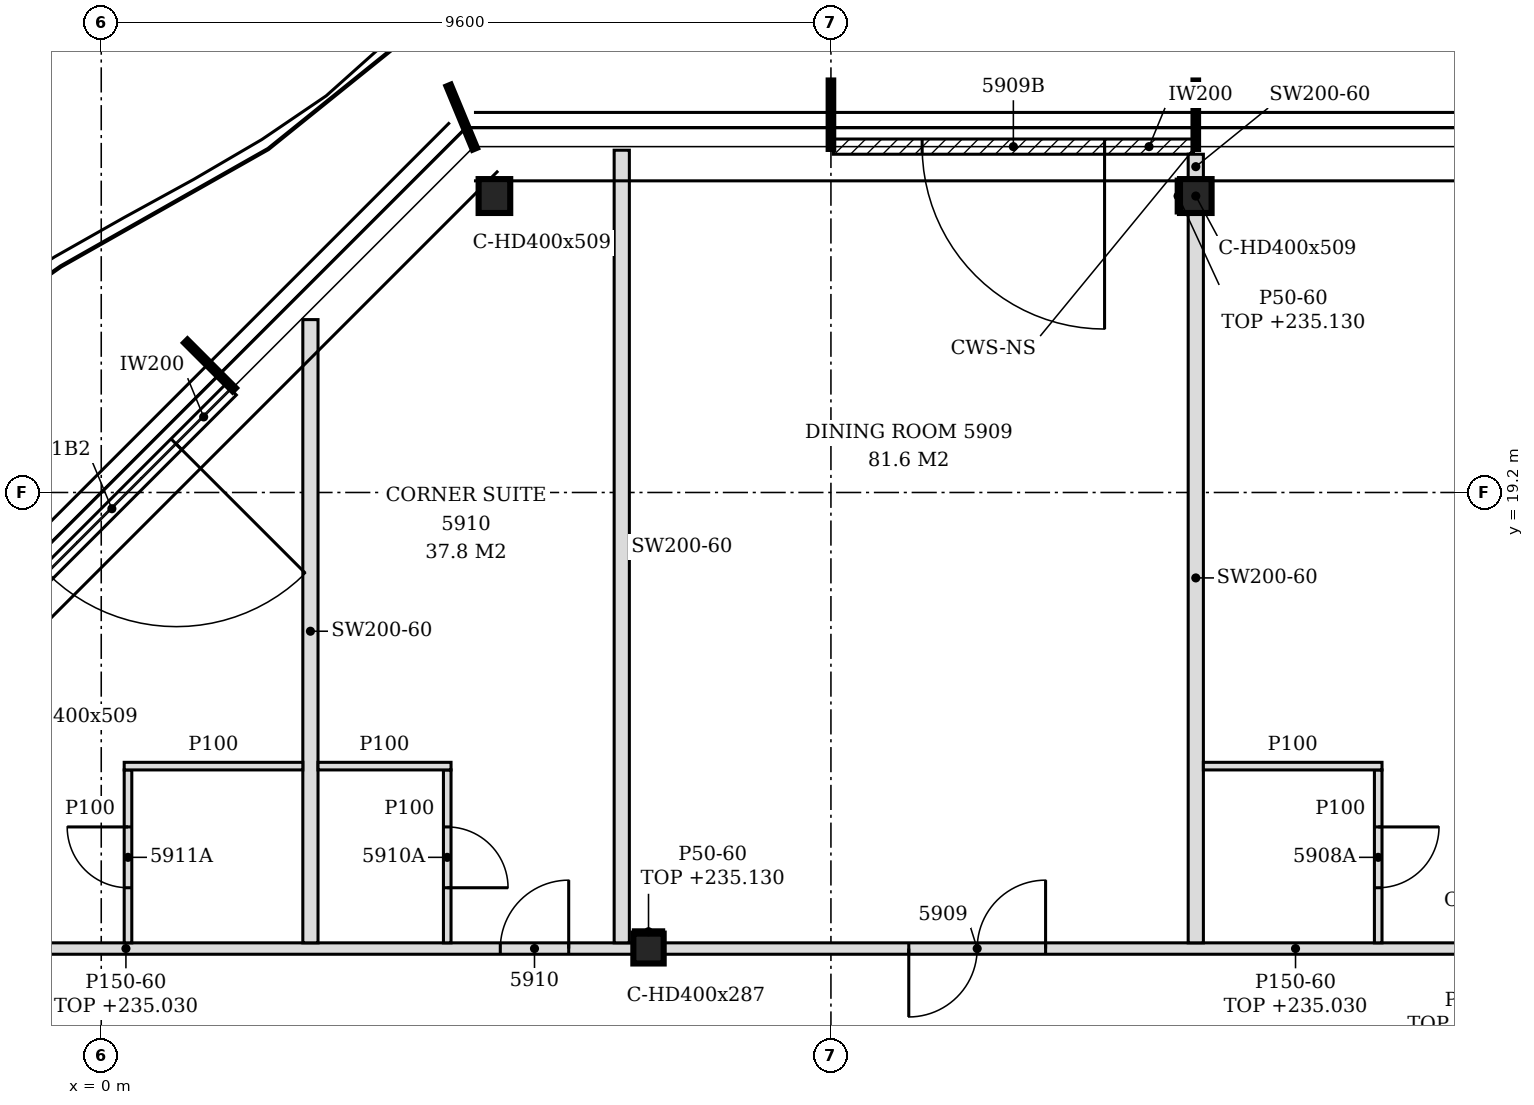
"""IFC4 building model, lengths in metres.
Left out: names, types, materials, properties, quantities, classifications, styles, units other than length and angle.
Written with IfcOpenShell. Run it as: python <this file> out.ifc"""

import sys

from ifc_helpers import new_model, si_unit, direction, frame, frame_2d, origin, origin_2d, place, context, subcontext, project, spatial, polyline, rectangle, i_section, outline, extrude, element, fill, save


model = new_model("IFC4")
c1 = context("Model", 3, precision=1e-05, world=origin(), true_north=direction((0.0, 1.0)))
c2 = subcontext(c1, "Body", "Model", "MODEL_VIEW")
j1 = project(units=[si_unit("LENGTHUNIT", "METRE"), si_unit("PLANEANGLEUNIT", "RADIAN")], contexts=[c1])
p1 = place(None, origin())
s1 = spatial("IfcSite", under=j1, at=p1, CompositionType="ELEMENT")
p2 = place(p1, origin())
s2 = spatial("IfcBuilding", under=s1, at=p2, CompositionType="ELEMENT")
p3 = place(p2, frame((0.0, 0.0, 232.2)))
s3 = spatial("IfcBuildingStorey", under=s2, at=p3, CompositionType="ELEMENT", Elevation=232.2)
for number, where, z_axis, x_axis in (
    (1, (14.4, 23.1, -0.15), (0.0, 0.0, 1.0), (1.0, 0.0, 0.0)),
    (2, (5.173, 23.1, -0.15), (0.0, 0.0, 1.0), (1.0, 0.0, 0.0)),
):
    element("IfcColumn", number, at=place(p3, frame(where, z_axis=z_axis, x_axis=x_axis)), inside=s3, PredefinedType="COLUMN", context=c2, shape_type="SweptSolid", body=[
        extrude(i_section(OverallWidth=0.416, OverallDepth=0.446, WebThickness=0.039, FlangeThickness=0.063, FilletRadius=0.015, at=origin_2d()), origin(), (0.0, 0.0, 1.0), 3.6),
    ])
p4 = place(p3, frame((7.2, 13.2, -0.15), z_axis=(0.0, 0.0, 1.0), x_axis=(1.0, 0.0, 0.0)))
e3 = element("IfcColumn", 3, at=p4, inside=s3, PredefinedType="COLUMN", context=c2, shape_type="SweptSolid", body=[
    extrude(i_section(OverallWidth=0.399, OverallDepth=0.393, WebThickness=0.023, FlangeThickness=0.037, FilletRadius=0.015, at=origin_2d()), origin(), (0.0, 0.0, 1.0), 3.6),
])
p5 = place(p3, frame((14.37, 23.75, 0.0), z_axis=(0.0, 0.0, 1.0), x_axis=(-1.0, 0.0, 0.0)))
e4 = element("IfcWall", 4, at=p5, inside=s3, PredefinedType="NOTDEFINED", context=c2, shape_type="SweptSolid", body=[
    extrude(rectangle(XDim=4.74, YDim=0.2, at=frame_2d((2.37, 0.0))), origin(), (0.0, 0.0, 1.0), 3.45),
])
p6 = place(p5, frame((1.17, 0.0, 0.0)))
e5 = element("IfcOpeningElement", 5, at=p6, cuts=e4, PredefinedType="OPENING", context=c2, shape_type="SweptSolid", body=[
    extrude(rectangle(XDim=2.4, YDim=2.4, at=frame_2d((1.2, 1.2))), frame((0.0, 0.11, 0.0), z_axis=(0.0, -1.0, 0.0), x_axis=(1.0, 0.0, 0.0)), (0.0, 0.0, 1.0), 0.22),
])
p7 = place(p3, frame((1.707, 20.553, 0.0), z_axis=(0.0, 0.0, 1.0), x_axis=(-0.707106781187, -0.707106781187, 0.0)))
e6 = element("IfcWall", 6, at=p7, inside=s3, PredefinedType="NOTDEFINED", context=c2, shape_type="SweptSolid", body=[
    extrude(rectangle(XDim=4.431, YDim=0.2, at=frame_2d((2.216, 0.0))), origin(), (0.0, 0.0, 1.0), 3.45),
])
p8 = place(p7, frame((1.016, 0.0, 0.0)))
e7 = element("IfcOpeningElement", 7, at=p8, cuts=e6, PredefinedType="OPENING", context=c2, shape_type="SweptSolid", body=[
    extrude(rectangle(XDim=2.4, YDim=2.4, at=frame_2d((1.2, 1.2))), frame((0.0, 0.11, 0.0), z_axis=(0.0, -1.0, 0.0), x_axis=(1.0, 0.0, 0.0)), (0.0, 0.0, 1.0), 0.22),
])
p9 = place(p3, frame((-4.601, 13.2, 0.0), z_axis=(0.0, 0.0, 1.0), x_axis=(1.0, 0.0, 0.0)))
e8 = element("IfcWall", 8, at=p9, inside=s3, PredefinedType="PARTITIONING", context=c2, shape_type="SweptSolid", body=[
    extrude(outline(polyline([(0.0, 0.0), (11.601, 0.0), (11.601, 2.83), (0.443, 2.83), (0.441, 2.63), (0.0, 2.63), (0.0, 0.0)])), frame((0.0, 0.075, 0.0), z_axis=(0.0, -1.0, 0.0), x_axis=(1.0, 0.0, 0.0)), (0.0, 0.0, 1.0), 0.15),
])
p10 = place(p9, frame((9.851, 0.0, 0.0)))
e9 = element("IfcOpeningElement", 9, at=p10, cuts=e8, PredefinedType="OPENING", context=c2, shape_type="SweptSolid", body=[
    extrude(rectangle(XDim=0.9, YDim=2.1, at=frame_2d((0.45, 1.05))), frame((0.0, 0.085, 0.0), z_axis=(0.0, -1.0, 0.0), x_axis=(1.0, 0.0, 0.0)), (0.0, 0.0, 1.0), 0.17),
])
p11 = place(p3, frame((7.399, 13.2, 0.0), z_axis=(0.0, 0.0, 1.0), x_axis=(1.0, 0.0, 0.0)))
e10 = element("IfcWall", 10, at=p11, inside=s3, PredefinedType="PARTITIONING", context=c2, shape_type="SweptSolid", body=[
    extrude(rectangle(XDim=11.601, YDim=0.15, at=frame_2d((5.801, 0.0))), origin(), (0.0, 0.0, 1.0), 2.83),
])
p12 = place(p11, frame((3.225, 0.0, 0.0)))
e11 = element("IfcOpeningElement", 11, at=p12, cuts=e10, PredefinedType="OPENING", context=c2, shape_type="SweptSolid", body=[
    extrude(rectangle(XDim=1.8, YDim=2.1, at=frame_2d((0.9, 1.05))), frame((0.0, 0.085, 0.0), z_axis=(0.0, -1.0, 0.0), x_axis=(1.0, 0.0, 0.0)), (0.0, 0.0, 1.0), 0.17),
])
p13 = place(p3, frame((0.352, 13.275, 0.0), z_axis=(0.0, 0.0, 1.0), x_axis=(0.0, 1.0, 0.0)))
e12 = element("IfcWall", 12, at=p13, inside=s3, PredefinedType="PARTITIONING", context=c2, shape_type="SweptSolid", body=[
    extrude(outline(polyline([(0.0, 0.0), (2.275, 0.0), (2.275, 3.45), (0.075, 3.45), (0.073, 2.83), (0.0, 2.83), (0.0, 0.0)])), frame((0.0, 0.05, 0.0), z_axis=(0.0, -1.0, 0.0), x_axis=(1.0, 0.0, 0.0)), (0.0, 0.0, 1.0), 0.1),
])
p14 = place(p13, frame((0.725, 0.0, 0.0)))
e13 = element("IfcOpeningElement", 13, at=p14, cuts=e12, PredefinedType="OPENING", context=c2, shape_type="SweptSolid", body=[
    extrude(rectangle(XDim=0.8, YDim=2.1, at=frame_2d((0.4, 1.05))), frame((0.0, 0.06, 0.0), z_axis=(0.0, -1.0, 0.0), x_axis=(1.0, 0.0, 0.0)), (0.0, 0.0, 1.0), 0.12),
])
p15 = place(p3, frame((2.752, 13.275, 0.0), z_axis=(0.0, 0.0, 1.0), x_axis=(0.0, 1.0, 0.0)))
e14 = element("IfcWall", 14, at=p15, inside=s3, PredefinedType="PARTITIONING", context=c2, shape_type="SweptSolid", body=[
    extrude(outline(polyline([(0.0, 0.0), (8.199, 0.0), (8.199, 3.45), (7.716, 3.45), (7.714, 2.93), (7.092, 2.93), (7.09, 3.45), (6.01, 3.45), (6.008, 3.07), (5.84, 3.07), (5.838, 3.45), (0.075, 3.45), (0.073, 2.83), (0.0, 2.83), (0.0, 0.0)])), frame((0.0, 0.1, 0.0), z_axis=(0.0, -1.0, 0.0), x_axis=(1.0, 0.0, 0.0)), (0.0, 0.0, 1.0), 0.2),
])
p16 = place(p3, frame((4.552, 13.275, 0.0), z_axis=(0.0, 0.0, 1.0), x_axis=(0.0, 1.0, 0.0)))
e15 = element("IfcWall", 15, at=p16, inside=s3, PredefinedType="PARTITIONING", context=c2, shape_type="SweptSolid", body=[
    extrude(outline(polyline([(0.0, 0.0), (2.275, 0.0), (2.275, 3.45), (0.075, 3.45), (0.073, 2.83), (0.0, 2.83), (0.0, 0.0)])), frame((0.0, 0.05, 0.0), z_axis=(0.0, -1.0, 0.0), x_axis=(1.0, 0.0, 0.0)), (0.0, 0.0, 1.0), 0.1),
])
p17 = place(p16, frame((0.725, 0.0, 0.0)))
e16 = element("IfcOpeningElement", 16, at=p17, cuts=e15, PredefinedType="OPENING", context=c2, shape_type="SweptSolid", body=[
    extrude(rectangle(XDim=0.8, YDim=2.1, at=frame_2d((0.4, 1.05))), frame((0.0, 0.06, 0.0), z_axis=(0.0, -1.0, 0.0), x_axis=(1.0, 0.0, 0.0)), (0.0, 0.0, 1.0), 0.12),
])
p18 = place(p3, frame((6.848, 13.275, 0.0), z_axis=(0.0, 0.0, 1.0), x_axis=(0.0, 1.0, 0.0)))
e17 = element("IfcWall", 17, at=p18, inside=s3, PredefinedType="PARTITIONING", context=c2, shape_type="SweptSolid", body=[
    extrude(outline(polyline([(0.0, 0.0), (10.428, 0.0), (10.428, 3.45), (9.975, 3.45), (9.973, 2.93), (9.675, 2.93), (9.673, 3.45), (6.01, 3.45), (6.008, 3.07), (5.84, 3.07), (5.838, 3.45), (0.075, 3.45), (0.073, 2.83), (0.0, 2.83), (0.0, 0.0)])), frame((0.0, 0.1, 0.0), z_axis=(0.0, -1.0, 0.0), x_axis=(1.0, 0.0, 0.0)), (0.0, 0.0, 1.0), 0.2),
])
p19 = place(p3, frame((14.4, 13.275, 0.0), z_axis=(0.0, 0.0, 1.0), x_axis=(0.0, 1.0, 0.0)))
e18 = element("IfcWall", 18, at=p19, inside=s3, PredefinedType="PARTITIONING", context=c2, shape_type="SweptSolid", body=[
    extrude(outline(polyline([(0.0, 0.0), (9.602, 0.0), (9.602, 3.45), (6.03, 3.45), (6.028, 2.88), (5.82, 2.88), (5.818, 3.45), (0.075, 3.45), (0.073, 2.83), (0.0, 2.83), (0.0, 0.0)])), frame((0.0, 0.1, 0.0), z_axis=(0.0, -1.0, 0.0), x_axis=(1.0, 0.0, 0.0)), (0.0, 0.0, 1.0), 0.2),
])
p20 = place(p3, frame((16.8, 13.275, 0.0), z_axis=(0.0, 0.0, 1.0), x_axis=(0.0, 1.0, 0.0)))
e19 = element("IfcWall", 19, at=p20, inside=s3, PredefinedType="PARTITIONING", context=c2, shape_type="SweptSolid", body=[
    extrude(outline(polyline([(0.0, 0.0), (2.275, 0.0), (2.275, 3.45), (0.075, 3.45), (0.073, 2.83), (0.0, 2.83), (0.0, 0.0)])), frame((0.0, 0.05, 0.0), z_axis=(0.0, -1.0, 0.0), x_axis=(1.0, 0.0, 0.0)), (0.0, 0.0, 1.0), 0.1),
])
p21 = place(p20, frame((0.725, 0.0, 0.0)))
e20 = element("IfcOpeningElement", 20, at=p21, cuts=e19, PredefinedType="OPENING", context=c2, shape_type="SweptSolid", body=[
    extrude(rectangle(XDim=0.8, YDim=2.1, at=frame_2d((0.4, 1.05))), frame((0.0, 0.06, 0.0), z_axis=(0.0, -1.0, 0.0), x_axis=(1.0, 0.0, 0.0)), (0.0, 0.0, 1.0), 0.12),
])
p22 = place(p3, frame((0.302, 15.6, 0.0), z_axis=(0.0, 0.0, 1.0), x_axis=(1.0, 0.0, 0.0)))
e21 = element("IfcWall", 21, at=p22, inside=s3, PredefinedType="PARTITIONING", context=c2, shape_type="SweptSolid", body=[
    extrude(rectangle(XDim=2.35, YDim=0.1, at=frame_2d((1.175, 0.0))), origin(), (0.0, 0.0, 1.0), 3.45),
])
p23 = place(p3, frame((2.852, 15.6, 0.0), z_axis=(0.0, 0.0, 1.0), x_axis=(1.0, 0.0, 0.0)))
e22 = element("IfcWall", 22, at=p23, inside=s3, PredefinedType="PARTITIONING", context=c2, shape_type="SweptSolid", body=[
    extrude(rectangle(XDim=1.75, YDim=0.1, at=frame_2d((0.875, 0.0))), origin(), (0.0, 0.0, 1.0), 3.45),
])
p24 = place(p3, frame((14.5, 15.6, 0.0), z_axis=(0.0, 0.0, 1.0), x_axis=(1.0, 0.0, 0.0)))
e23 = element("IfcWall", 23, at=p24, inside=s3, PredefinedType="PARTITIONING", context=c2, shape_type="SweptSolid", body=[
    extrude(rectangle(XDim=2.35, YDim=0.1, at=frame_2d((1.175, 0.0))), origin(), (0.0, 0.0, 1.0), 3.45),
])
p25 = place(p3, frame((14.4, 23.323, 0.0), z_axis=(0.0, 0.0, 1.0), x_axis=(0.0, 1.0, 0.0)))
e24 = element("IfcWall", 24, at=p25, inside=s3, PredefinedType="PARTITIONING", context=c2, shape_type="SweptSolid", body=[
    extrude(rectangle(XDim=0.327, YDim=0.2, at=frame_2d((0.164, 0.0))), origin(), (0.0, 0.0, 1.0), 3.45),
])
p26 = place(p3, frame((7.0, 13.421, 0.0), z_axis=(0.0, 0.0, 1.0), x_axis=(1.0, 0.0, 0.0)))
e25 = element("IfcWall", 25, at=p26, inside=s3, PredefinedType="PARTITIONING", context=c2, shape_type="SweptSolid", body=[
    extrude(rectangle(XDim=0.399, YDim=0.05, at=frame_2d((0.199, 0.0))), origin(), (0.0, 0.0, 1.0), 2.93),
])
p27 = place(p3, frame((14.167, 22.877, 0.0), z_axis=(0.0, 0.0, 1.0), x_axis=(0.0, 1.0, 0.0)))
e26 = element("IfcWall", 26, at=p27, inside=s3, PredefinedType="PARTITIONING", context=c2, shape_type="SweptSolid", body=[
    extrude(rectangle(XDim=0.446, YDim=0.05, at=frame_2d((0.223, 0.0))), origin(), (0.0, 0.0, 1.0), 2.93),
])
p28 = place(p6, origin())
e27 = element("IfcDoor", 27, at=p28, inside=s3, OperationType="SINGLE_SWING_LEFT", PredefinedType="DOOR", context=c2, shape_type="SweptSolid", body=[
    extrude(rectangle(XDim=2.4, YDim=2.4, at=frame_2d((1.2, 1.2))), frame((0.0, 0.025, 0.0), z_axis=(0.0, -1.0, 0.0), x_axis=(1.0, 0.0, 0.0)), (0.0, 0.0, 1.0), 0.05),
])
fill(e5, e27)
p29 = place(p8, origin())
e28 = element("IfcDoor", 28, at=p29, inside=s3, OperationType="SINGLE_SWING_LEFT", PredefinedType="DOOR", context=c2, shape_type="SweptSolid", body=[
    extrude(rectangle(XDim=2.4, YDim=2.4, at=frame_2d((1.2, 1.2))), frame((0.0, 0.025, 0.0), z_axis=(0.0, -1.0, 0.0), x_axis=(1.0, 0.0, 0.0)), (0.0, 0.0, 1.0), 0.05),
])
fill(e7, e28)
p30 = place(p21, frame((0.8, 0.0, 0.0), z_axis=(0.0, 0.0, 1.0), x_axis=(-1.0, 0.0, 0.0)))
e29 = element("IfcDoor", 29, at=p30, inside=s3, OperationType="SINGLE_SWING_LEFT", PredefinedType="DOOR", context=c2, shape_type="SweptSolid", body=[
    extrude(rectangle(XDim=0.8, YDim=2.1, at=frame_2d((0.4, 1.05))), frame((0.0, 0.025, 0.0), z_axis=(0.0, -1.0, 0.0), x_axis=(1.0, 0.0, 0.0)), (0.0, 0.0, 1.0), 0.05),
])
fill(e20, e29)
p31 = place(p12, origin())
e30 = element("IfcDoor", 30, at=p31, inside=s3, OperationType="DOUBLE_DOOR_SINGLE_SWING", PredefinedType="DOOR", context=c2, shape_type="SweptSolid", body=[
    extrude(rectangle(XDim=1.8, YDim=2.1, at=frame_2d((0.9, 1.05))), frame((0.0, 0.025, 0.0), z_axis=(0.0, -1.0, 0.0), x_axis=(1.0, 0.0, 0.0)), (0.0, 0.0, 1.0), 0.05),
])
fill(e11, e30)
p32 = place(p10, origin())
e31 = element("IfcDoor", 31, at=p32, inside=s3, OperationType="SINGLE_SWING_RIGHT", PredefinedType="DOOR", context=c2, shape_type="SweptSolid", body=[
    extrude(rectangle(XDim=0.9, YDim=2.1, at=frame_2d((0.45, 1.05))), frame((0.0, 0.025, 0.0), z_axis=(0.0, -1.0, 0.0), x_axis=(1.0, 0.0, 0.0)), (0.0, 0.0, 1.0), 0.05),
])
fill(e9, e31)
p33 = place(p17, frame((0.8, 0.0, 0.0), z_axis=(0.0, 0.0, 1.0), x_axis=(-1.0, 0.0, 0.0)))
e32 = element("IfcDoor", 32, at=p33, inside=s3, OperationType="SINGLE_SWING_RIGHT", PredefinedType="DOOR", context=c2, shape_type="SweptSolid", body=[
    extrude(rectangle(XDim=0.8, YDim=2.1, at=frame_2d((0.4, 1.05))), frame((0.0, 0.025, 0.0), z_axis=(0.0, -1.0, 0.0), x_axis=(1.0, 0.0, 0.0)), (0.0, 0.0, 1.0), 0.05),
])
fill(e16, e32)
p34 = place(p14, origin())
e33 = element("IfcDoor", 33, at=p34, inside=s3, OperationType="SINGLE_SWING_RIGHT", PredefinedType="DOOR", context=c2, shape_type="SweptSolid", body=[
    extrude(rectangle(XDim=0.8, YDim=2.1, at=frame_2d((0.4, 1.05))), frame((0.0, 0.025, 0.0), z_axis=(0.0, -1.0, 0.0), x_axis=(1.0, 0.0, 0.0)), (0.0, 0.0, 1.0), 0.05),
])
fill(e13, e33)
save(model, sys.argv[1])
